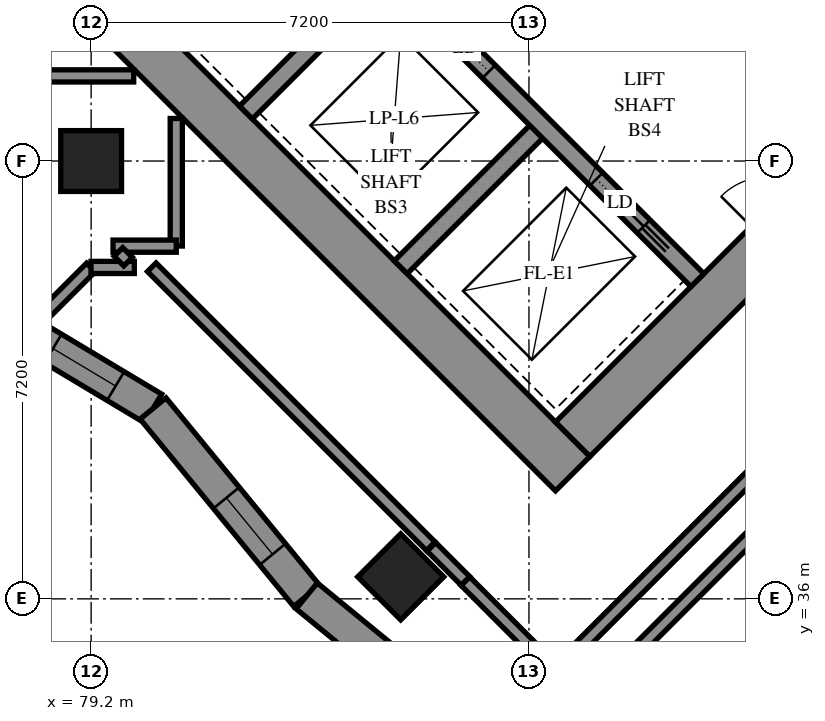
"""IFC4 building model, lengths in metres.
Left out: names, types, materials, properties, quantities, classifications, styles, units other than length and angle.
Written with IfcOpenShell. Run it as: python <this file> out.ifc"""

import sys

from ifc_helpers import new_model, si_unit, direction, frame, frame_2d, origin, origin_2d, place, context, subcontext, project, spatial, polyline, rectangle, outline, extrude, element, fill, save


model = new_model("IFC4")
c1 = context("Model", 3, precision=1e-05, world=origin(), true_north=direction((0.0, 1.0)))
c2 = subcontext(c1, "Body", "Model", "MODEL_VIEW")
j1 = project(units=[si_unit("LENGTHUNIT", "METRE"), si_unit("PLANEANGLEUNIT", "RADIAN")], contexts=[c1])
p1 = place(None, origin())
s1 = spatial("IfcSite", under=j1, at=p1, CompositionType="ELEMENT")
p2 = place(p1, origin())
s2 = spatial("IfcBuilding", under=s1, at=p2, CompositionType="ELEMENT")
p3 = place(p2, frame((0.0, 0.0, 91.4)))
s3 = spatial("IfcBuildingStorey", under=s2, at=p3, CompositionType="ELEMENT", Elevation=91.4)
for number, where, z_axis, x_axis in (
    (1, (79.2, 43.2, 0.0), (0.0, 0.0, 1.0), (1.0, 0.0, 0.0)),
    (2, (84.291, 36.362, 0.0), (0.0, 0.0, 1.0), (0.707, -0.707, 0.0)),
):
    element("IfcColumn", number, at=place(p3, frame(where, z_axis=z_axis, x_axis=x_axis)), inside=s3, PredefinedType="COLUMN", context=c2, shape_type="SweptSolid", body=[
        extrude(rectangle(XDim=1.0, YDim=1.0, at=origin_2d()), origin(), (0.0, 0.0, 1.0), 3.1),
    ])
p4 = place(p3, frame((75.806, 49.373, -0.3), z_axis=(0.0, 0.0, 1.0), x_axis=(0.7071067812, -0.7071067812, 0.0)))
e3 = element("IfcWall", 3, at=p4, inside=s3, PredefinedType="SHEAR", context=c2, shape_type="SweptSolid", body=[
    extrude(rectangle(XDim=16.0, YDim=0.8, at=frame_2d((8.0, 0.0))), origin(), (0.0, 0.0, 1.0), 2.7),
])
p5 = place(p3, frame((87.12, 38.625, -0.3), z_axis=(0.0, 0.0, 1.0), x_axis=(0.7071067812, 0.7071067812, 0.0)))
e4 = element("IfcWall", 4, at=p5, inside=s3, PredefinedType="SHEAR", context=c2, shape_type="SweptSolid", body=[
    extrude(rectangle(XDim=14.4, YDim=0.8, at=frame_2d((7.2, 0.0))), origin(), (0.0, 0.0, 1.0), 2.7),
])
p6 = place(p5, frame((4.55, 0.0, 0.3)))
e5 = element("IfcOpeningElement", 5, at=p6, cuts=e4, PredefinedType="OPENING", context=c2, shape_type="SweptSolid", body=[
    extrude(rectangle(XDim=1.1, YDim=2.1, at=frame_2d((0.55, 1.05))), frame((0.0, 0.41, 0.0), z_axis=(0.0, -1.0, 0.0), x_axis=(1.0, 0.0, 0.0)), (0.0, 0.0, 1.0), 0.82),
])
p7 = place(p5, frame((11.35, 0.0, 0.3)))
e6 = element("IfcOpeningElement", 6, at=p7, cuts=e4, PredefinedType="OPENING", context=c2, shape_type="SweptSolid", body=[
    extrude(rectangle(XDim=1.1, YDim=2.1, at=frame_2d((0.55, 1.05))), frame((0.0, 0.41, 0.0), z_axis=(0.0, -1.0, 0.0), x_axis=(1.0, 0.0, 0.0)), (0.0, 0.0, 1.0), 0.82),
])
for number, where, z_axis, x_axis in (
    (7, (81.746, 43.999, 0.0), (0.0, 0.0, 1.0), (0.707, 0.707, 0.0)),
    (8, (84.291, 41.453, 0.0), (0.0, 0.0, 1.0), (0.707, 0.707, 0.0)),
):
    element("IfcWall", number, at=place(p3, frame(where, z_axis=z_axis, x_axis=x_axis)), inside=s3, PredefinedType="SOLIDWALL", context=c2, shape_type="SweptSolid", body=[
        extrude(rectangle(XDim=3.3, YDim=0.3, at=frame_2d((1.65, 0.0))), origin(), (0.0, 0.0, 1.0), 3.1),
    ])
p8 = place(p3, frame((78.988, 51.423, 0.0), z_axis=(0.0, 0.0, 1.0), x_axis=(0.7071067812, -0.7071067812, 0.0)))
e9 = element("IfcWall", 9, at=p8, inside=s3, PredefinedType="SOLIDWALL", context=c2, shape_type="SweptSolid", body=[
    extrude(rectangle(XDim=14.4, YDim=0.3, at=frame_2d((7.2, 0.0))), origin(), (0.0, 0.0, 1.0), 3.1),
])
p9 = place(p8, frame((1.25, 0.0, 0.0)))
e10 = element("IfcOpeningElement", 10, at=p9, cuts=e9, PredefinedType="OPENING", context=c2, shape_type="SweptSolid", body=[
    extrude(rectangle(XDim=1.1, YDim=2.1, at=frame_2d((0.55, 1.05))), frame((0.0, 0.16, 0.0), z_axis=(0.0, -1.0, 0.0), x_axis=(1.0, 0.0, 0.0)), (0.0, 0.0, 1.0), 0.32),
])
p10 = place(p8, frame((4.85, 0.0, 0.0)))
e11 = element("IfcOpeningElement", 11, at=p10, cuts=e9, PredefinedType="OPENING", context=c2, shape_type="SweptSolid", body=[
    extrude(rectangle(XDim=1.1, YDim=2.1, at=frame_2d((0.55, 1.05))), frame((0.0, 0.16, 0.0), z_axis=(0.0, -1.0, 0.0), x_axis=(1.0, 0.0, 0.0)), (0.0, 0.0, 1.0), 0.32),
])
p11 = place(p8, frame((8.45, 0.0, 0.0)))
e12 = element("IfcOpeningElement", 12, at=p11, cuts=e9, PredefinedType="OPENING", context=c2, shape_type="SweptSolid", body=[
    extrude(rectangle(XDim=1.1, YDim=2.1, at=frame_2d((0.55, 1.05))), frame((0.0, 0.16, 0.0), z_axis=(0.0, -1.0, 0.0), x_axis=(1.0, 0.0, 0.0)), (0.0, 0.0, 1.0), 0.32),
])
p12 = place(p8, frame((12.05, 0.0, 0.0)))
e13 = element("IfcOpeningElement", 13, at=p12, cuts=e9, PredefinedType="OPENING", context=c2, shape_type="SweptSolid", body=[
    extrude(rectangle(XDim=1.1, YDim=2.1, at=frame_2d((0.55, 1.05))), frame((0.0, 0.16, 0.0), z_axis=(0.0, -1.0, 0.0), x_axis=(1.0, 0.0, 0.0)), (0.0, 0.0, 1.0), 0.32),
])
p13 = place(p3, frame((81.534, 53.969, 0.0), z_axis=(0.0, 0.0, 1.0), x_axis=(0.707103309, -0.7071102534, 0.0)))
e14 = element("IfcWall", 14, at=p13, inside=s3, PredefinedType="SOLIDWALL", context=c2, shape_type="SweptSolid", body=[
    extrude(rectangle(XDim=14.4, YDim=0.3, at=frame_2d((7.2, 0.0))), origin(), (0.0, 0.0, 1.0), 3.1),
])
p14 = place(p13, frame((12.05, 0.0, 0.0)))
e15 = element("IfcOpeningElement", 15, at=p14, cuts=e14, PredefinedType="OPENING", context=c2, shape_type="SweptSolid", body=[
    extrude(rectangle(XDim=1.1, YDim=2.1, at=frame_2d((0.55, 1.05))), frame((0.0, 0.16, 0.0), z_axis=(0.0, -1.0, 0.0), x_axis=(1.0, 0.0, 0.0)), (0.0, 0.0, 1.0), 0.32),
])
p15 = place(p3, frame((76.656, 41.263, 0.0), z_axis=(0.0, 0.0, 1.0), x_axis=(0.8580683787, -0.513535449, 0.0)))
e16 = element("IfcWall", 16, at=p15, inside=s3, PredefinedType="SOLIDWALL", context=c2, shape_type="SweptSolid", body=[
    extrude(outline(polyline([(0.036, -0.275), (4.104, -0.275), (4.199, 0.275), (-0.036, 0.275), (0.036, -0.275)])), origin(), (0.0, 0.0, 1.0), 3.1),
])
p16 = place(p15, frame((0.358, 0.0, 0.5)))
e17 = element("IfcOpeningElement", 17, at=p16, cuts=e16, PredefinedType="OPENING", context=c2, shape_type="SweptSolid", body=[
    extrude(rectangle(XDim=1.2, YDim=2.45, at=frame_2d((0.6, 1.225))), frame((0.0, 0.285, 0.0), z_axis=(0.0, -1.0, 0.0), x_axis=(1.0, 0.0, 0.0)), (0.0, 0.0, 1.0), 0.57),
])
p17 = place(p15, frame((2.234, 0.0, 0.5)))
e18 = element("IfcOpeningElement", 18, at=p17, cuts=e16, PredefinedType="OPENING", context=c2, shape_type="SweptSolid", body=[
    extrude(rectangle(XDim=1.2, YDim=2.45, at=frame_2d((0.6, 1.225))), frame((0.0, 0.285, 0.0), z_axis=(0.0, -1.0, 0.0), x_axis=(1.0, 0.0, 0.0)), (0.0, 0.0, 1.0), 0.57),
])
p18 = place(p3, frame((80.218, 39.131, 0.0), z_axis=(0.0, 0.0, 1.0), x_axis=(0.6339289391, -0.7733912983, 0.0)))
e19 = element("IfcWall", 19, at=p18, inside=s3, PredefinedType="SOLIDWALL", context=c2, shape_type="SweptSolid", body=[
    extrude(outline(polyline([(0.048, -0.275), (4.013, -0.275), (3.958, 0.275), (-0.048, 0.275), (0.048, -0.275)])), origin(), (0.0, 0.0, 1.0), 3.1),
])
p19 = place(p18, frame((1.901, 0.0, 0.5)))
e20 = element("IfcOpeningElement", 20, at=p19, cuts=e19, PredefinedType="OPENING", context=c2, shape_type="SweptSolid", body=[
    extrude(rectangle(XDim=1.2, YDim=2.45, at=frame_2d((0.6, 1.225))), frame((0.0, 0.285, 0.0), z_axis=(0.0, -1.0, 0.0), x_axis=(1.0, 0.0, 0.0)), (0.0, 0.0, 1.0), 0.57),
])
p20 = place(p3, frame((82.745, 36.049, 0.0), z_axis=(0.0, 0.0, 1.0), x_axis=(0.7733872397, -0.6339338904, 0.0)))
e21 = element("IfcWall", 21, at=p20, inside=s3, PredefinedType="SOLIDWALL", context=c2, shape_type="SweptSolid", body=[
    extrude(outline(polyline([(-0.027, -0.275), (3.938, -0.275), (3.992, 0.275), (0.027, 0.275), (-0.027, -0.275)])), origin(), (0.0, 0.0, 1.0), 3.1),
])
p21 = place(p20, frame((1.721, 0.0, 0.5)))
e22 = element("IfcOpeningElement", 22, at=p21, cuts=e21, PredefinedType="OPENING", context=c2, shape_type="SweptSolid", body=[
    extrude(rectangle(XDim=1.2, YDim=2.45, at=frame_2d((0.6, 1.225))), frame((0.0, 0.285, 0.0), z_axis=(0.0, -1.0, 0.0), x_axis=(1.0, 0.0, 0.0)), (0.0, 0.0, 1.0), 0.57),
])
p22 = place(p3, frame((86.835, 34.806, 0.0), z_axis=(0.0, 0.0, 1.0), x_axis=(0.7071067812, 0.7071067812, 0.0)))
e23 = element("IfcWall", 23, at=p22, inside=s3, PredefinedType="PARTITIONING", context=c2, shape_type="SweptSolid", body=[
    extrude(rectangle(XDim=9.201, YDim=0.2, at=frame_2d((4.601, 0.0))), origin(), (0.0, 0.0, 1.0), 3.1),
])
p23 = place(p3, frame((86.345, 33.319, 0.0), z_axis=(0.0, 0.0, 1.0), x_axis=(0.7069848221, 0.7072287193, 0.0)))
e24 = element("IfcWall", 24, at=p23, inside=s3, PredefinedType="PARTITIONING", context=c2, shape_type="SweptSolid", body=[
    extrude(rectangle(XDim=8.2, YDim=0.2, at=frame_2d((4.1, 0.0))), origin(), (0.0, 0.0, 1.0), 3.1),
])
p24 = place(p3, frame((80.197, 41.453, 0.0), z_axis=(0.0, 0.0, 1.0), x_axis=(0.7071067812, -0.7071067812, 0.0)))
e25 = element("IfcWall", 25, at=p24, inside=s3, PredefinedType="PARTITIONING", context=c2, shape_type="SweptSolid", body=[
    extrude(rectangle(XDim=6.488, YDim=0.2, at=frame_2d((3.244, 0.0))), origin(), (0.0, 0.0, 1.0), 3.1),
])
p25 = place(p3, frame((89.881, 31.771, 0.0), z_axis=(0.0, 0.0, 1.0), x_axis=(0.7071067812, 0.7071067812, 0.0)))
e26 = element("IfcWall", 26, at=p25, inside=s3, PredefinedType="PARTITIONING", context=c2, shape_type="SweptSolid", body=[
    extrude(rectangle(XDim=5.787, YDim=0.2, at=frame_2d((2.893, 0.0))), origin(), (0.0, 0.0, 1.0), 3.1),
])
p26 = place(p3, frame((85.353, 36.293, 0.0), z_axis=(0.0, 0.0, 1.0), x_axis=(0.7066304548, -0.7075827869, 0.0)))
e27 = element("IfcWall", 27, at=p26, inside=s3, PredefinedType="PARTITIONING", context=c2, shape_type="SweptSolid", body=[
    extrude(rectangle(XDim=2.1, YDim=0.2, at=frame_2d((1.05, 0.0))), origin(), (0.0, 0.0, 1.0), 3.1),
])
for number, where, z_axis, x_axis in (
    (28, (77.802, 44.6, 0.0), (0.0, 0.0, 1.0), (1.0, 0.0, 0.0)),
    (29, (80.6, 41.802, 0.0), (0.0, 0.0, 1.0), (0.0, 1.0, 0.0)),
):
    element("IfcWall", number, at=place(p3, frame(where, z_axis=z_axis, x_axis=x_axis)), inside=s3, PredefinedType="PARTITIONING", context=c2, shape_type="SweptSolid", body=[
        extrude(rectangle(XDim=2.098, YDim=0.2, at=frame_2d((1.049, 0.0))), origin(), (0.0, 0.0, 1.0), 3.1),
    ])
p27 = place(p3, frame((78.328, 40.583, 0.0), z_axis=(0.0, 0.0, 1.0), x_axis=(0.7071067812, 0.7071067812, 0.0)))
e30 = element("IfcWall", 30, at=p27, inside=s3, PredefinedType="PARTITIONING", context=c2, shape_type="SweptSolid", body=[
    extrude(rectangle(XDim=1.227, YDim=0.2, at=frame_2d((0.613, 0.0))), origin(), (0.0, 0.0, 1.0), 3.1),
])
p28 = place(p3, frame((79.56, 41.8, 0.0), z_axis=(0.0, 0.0, 1.0), x_axis=(1.0, 0.0, 0.0)))
e31 = element("IfcWall", 31, at=p28, inside=s3, PredefinedType="PARTITIONING", context=c2, shape_type="SweptSolid", body=[
    extrude(rectangle(XDim=1.04, YDim=0.2, at=frame_2d((0.52, 0.0))), origin(), (0.0, 0.0, 1.0), 3.1),
])
p29 = place(p3, frame((84.795, 36.855, 0.0), z_axis=(0.0, 0.0, 1.0), x_axis=(0.7071067812, -0.7071067812, 0.0)))
e32 = element("IfcWall", 32, at=p29, inside=s3, PredefinedType="PARTITIONING", context=c2, shape_type="SweptSolid", body=[
    extrude(rectangle(XDim=0.792, YDim=0.2, at=frame_2d((0.396, 0.0))), origin(), (0.0, 0.0, 1.0), 3.1),
])
p30 = place(p3, frame((79.198, 41.45, 0.0), z_axis=(0.0, 0.0, 1.0), x_axis=(1.0, 0.0, 0.0)))
e33 = element("IfcWall", 33, at=p30, inside=s3, PredefinedType="PARTITIONING", context=c2, shape_type="SweptSolid", body=[
    extrude(rectangle(XDim=0.712, YDim=0.2, at=frame_2d((0.356, 0.0))), origin(), (0.0, 0.0, 1.0), 3.1),
])
p31 = place(p3, frame((79.649, 41.705, 0.0), z_axis=(0.0, 0.0, 1.0), x_axis=(0.7068844555, -0.707329037, 0.0)))
e34 = element("IfcWall", 34, at=p31, inside=s3, PredefinedType="PARTITIONING", context=c2, shape_type="SweptSolid", body=[
    extrude(rectangle(XDim=0.225, YDim=0.2, at=frame_2d((0.112, 0.0))), origin(), (0.0, 0.0, 1.0), 3.1),
])
p32 = place(p17, origin())
e35 = element("IfcWindow", 35, at=p32, inside=s3, PartitioningType="SINGLE_PANEL", PredefinedType="WINDOW", context=c2, shape_type="SweptSolid", body=[
    extrude(rectangle(XDim=1.2, YDim=2.45, at=frame_2d((0.6, 1.225))), frame((0.0, 0.155, 0.0), z_axis=(0.0, -1.0, 0.0), x_axis=(1.0, 0.0, 0.0)), (0.0, 0.0, 1.0), 0.06),
])
fill(e18, e35)
p33 = place(p19, origin())
e36 = element("IfcWindow", 36, at=p33, inside=s3, PartitioningType="SINGLE_PANEL", PredefinedType="WINDOW", context=c2, shape_type="SweptSolid", body=[
    extrude(rectangle(XDim=1.2, YDim=2.45, at=frame_2d((0.6, 1.225))), frame((0.0, 0.155, 0.0), z_axis=(0.0, -1.0, 0.0), x_axis=(1.0, 0.0, 0.0)), (0.0, 0.0, 1.0), 0.06),
])
fill(e20, e36)
p34 = place(p11, origin())
e37 = element("IfcDoor", 37, at=p34, inside=s3, OperationType="SLIDING_TO_LEFT", PredefinedType="DOOR", context=c2, shape_type="SweptSolid", body=[
    extrude(rectangle(XDim=1.1, YDim=2.1, at=frame_2d((0.55, 1.05))), frame((0.0, 0.025, 0.0), z_axis=(0.0, -1.0, 0.0), x_axis=(1.0, 0.0, 0.0)), (0.0, 0.0, 1.0), 0.05),
])
fill(e12, e37)
p35 = place(p12, origin())
e38 = element("IfcDoor", 38, at=p35, inside=s3, OperationType="SLIDING_TO_RIGHT", PredefinedType="DOOR", context=c2, shape_type="SweptSolid", body=[
    extrude(rectangle(XDim=1.1, YDim=2.1, at=frame_2d((0.55, 1.05))), frame((0.0, 0.025, 0.0), z_axis=(0.0, -1.0, 0.0), x_axis=(1.0, 0.0, 0.0)), (0.0, 0.0, 1.0), 0.05),
])
fill(e13, e38)
save(model, sys.argv[1])
